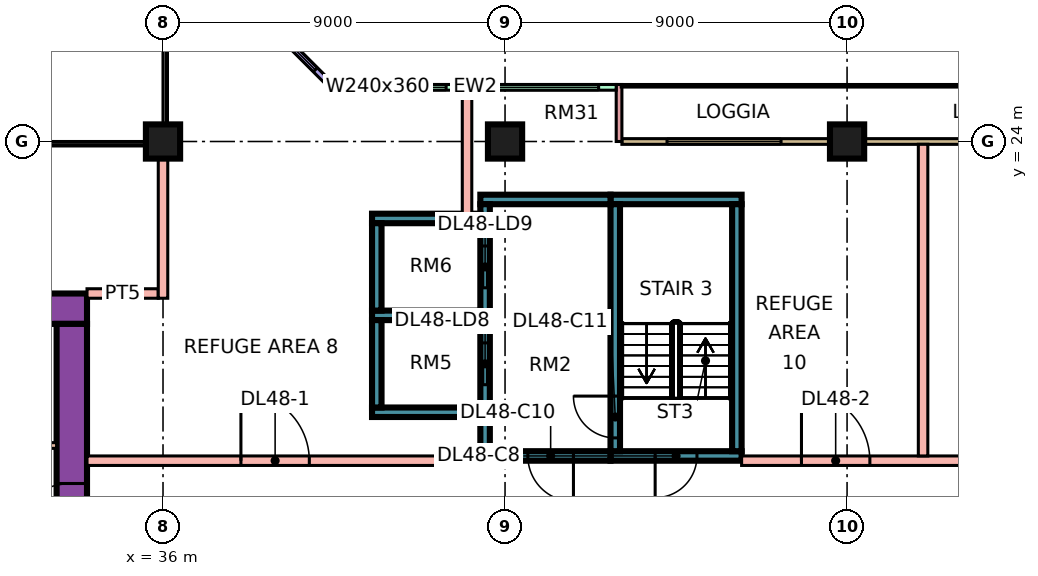
"""IFC4 building model, lengths in metres.
Left out: names, types, materials, properties, quantities, classifications, styles, units other than length and angle.
Written with IfcOpenShell. Run it as: python <this file> out.ifc"""

import sys

from ifc_helpers import new_model, si_unit, direction, frame, frame_2d, origin, origin_2d, place, context, subcontext, project, spatial, rectangle, extrude, element, fill, save


model = new_model("IFC4")
c1 = context("Model", 3, precision=1e-05, world=origin(), true_north=direction((0.0, 1.0)))
c2 = subcontext(c1, "Body", "Model", "MODEL_VIEW")
j1 = project(units=[si_unit("LENGTHUNIT", "METRE"), si_unit("PLANEANGLEUNIT", "RADIAN")], contexts=[c1])
p1 = place(None, origin())
s1 = spatial("IfcSite", under=j1, at=p1, CompositionType="ELEMENT")
p2 = place(p1, origin())
s2 = spatial("IfcBuilding", under=s1, at=p2, CompositionType="ELEMENT")
p3 = place(p2, frame((0.0, 0.0, 206.15)))
s3 = spatial("IfcBuildingStorey", under=s2, at=p3, CompositionType="ELEMENT", Elevation=206.15)
for number, where, z_axis, x_axis in (
    (1, (36.0, 24.0, 0.0), (0.0, 0.0, 1.0), (1.0, 0.0, 0.0)),
    (2, (45.0, 24.0, 0.0), (0.0, 0.0, 1.0), (1.0, 0.0, 0.0)),
    (3, (54.0, 24.0, 0.0), (0.0, 0.0, 1.0), (1.0, 0.0, 0.0)),
):
    element("IfcColumn", number, at=place(p3, frame(where, z_axis=z_axis, x_axis=x_axis)), inside=s3, PredefinedType="COLUMN", context=c2, shape_type="SweptSolid", body=[
        extrude(rectangle(XDim=0.9, YDim=0.9, at=origin_2d()), origin(), (0.0, 0.0, 1.0), 5.5),
    ])
p4 = place(p3, frame((9.0, 19.6, 0.0), z_axis=(0.0, 0.0, 1.0), x_axis=(1.0, 0.0, 0.0)))
e4 = element("IfcWall", 4, at=p4, inside=s3, PredefinedType="SHEAR", context=c2, shape_type="SweptSolid", body=[
    extrude(rectangle(XDim=25.0, YDim=0.8, at=frame_2d((12.5, 0.0))), origin(), (0.0, 0.0, 1.0), 5.5),
])
p5 = place(p4, frame((19.1, 0.0, 0.0)))
e5 = element("IfcOpeningElement", 5, at=p5, cuts=e4, PredefinedType="OPENING", context=c2, shape_type="SweptSolid", body=[
    extrude(rectangle(XDim=1.8, YDim=2.4, at=frame_2d((0.9, 1.2))), frame((0.0, 0.41, 0.0), z_axis=(0.0, -1.0, 0.0), x_axis=(1.0, 0.0, 0.0)), (0.0, 0.0, 1.0), 0.82),
])
p6 = place(p3, frame((33.6, 7.8, 0.0), z_axis=(0.0, 0.0, 1.0), x_axis=(0.0, 1.0, 0.0)))
e6 = element("IfcWall", 6, at=p6, inside=s3, PredefinedType="SHEAR", context=c2, shape_type="SweptSolid", body=[
    extrude(rectangle(XDim=11.4, YDim=0.8, at=frame_2d((5.7, 0.0))), origin(), (0.0, 0.0, 1.0), 5.5),
])
p7 = place(p6, frame((5.4, 0.0, 0.0)))
e7 = element("IfcOpeningElement", 7, at=p7, cuts=e6, PredefinedType="OPENING", context=c2, shape_type="SweptSolid", body=[
    extrude(rectangle(XDim=1.8, YDim=2.4, at=frame_2d((0.9, 1.2))), frame((0.0, 0.41, 0.0), z_axis=(0.0, -1.0, 0.0), x_axis=(1.0, 0.0, 0.0)), (0.0, 0.0, 1.0), 0.82),
])
p8 = place(p3, frame((47.775, 15.725, 0.0), z_axis=(0.0, 0.0, 1.0), x_axis=(1.0, 0.0, 0.0)))
e8 = element("IfcWall", 8, at=p8, inside=s3, PredefinedType="SHEAR", context=c2, shape_type="SweptSolid", body=[
    extrude(rectangle(XDim=3.45, YDim=0.25, at=frame_2d((1.725, 0.0))), origin(), (0.0, 0.0, 1.0), 5.5),
])
p9 = place(p8, frame((1.175, 0.0, 0.0)))
e9 = element("IfcOpeningElement", 9, at=p9, cuts=e8, PredefinedType="OPENING", context=c2, shape_type="SweptSolid", body=[
    extrude(rectangle(XDim=1.1, YDim=2.2, at=frame_2d((0.55, 1.1))), frame((0.0, 0.135, 0.0), z_axis=(0.0, -1.0, 0.0), x_axis=(1.0, 0.0, 0.0)), (0.0, 0.0, 1.0), 0.27),
])
p10 = place(p3, frame((47.775, 22.475, 0.0), z_axis=(0.0, 0.0, 1.0), x_axis=(1.0, 0.0, 0.0)))
e10 = element("IfcWall", 10, at=p10, inside=s3, PredefinedType="SHEAR", context=c2, shape_type="SweptSolid", body=[
    extrude(rectangle(XDim=3.45, YDim=0.25, at=frame_2d((1.725, 0.0))), origin(), (0.0, 0.0, 1.0), 5.5),
])
p11 = place(p3, frame((47.9, 15.85, 0.0), z_axis=(0.0, 0.0, 1.0), x_axis=(0.0, 1.0, 0.0)))
e11 = element("IfcWall", 11, at=p11, inside=s3, PredefinedType="SHEAR", context=c2, shape_type="SweptSolid", body=[
    extrude(rectangle(XDim=6.5, YDim=0.25, at=frame_2d((3.25, 0.0))), origin(), (0.0, 0.0, 1.0), 5.5),
])
p12 = place(p11, frame((0.35, 0.0, 0.0)))
e12 = element("IfcOpeningElement", 12, at=p12, cuts=e11, PredefinedType="OPENING", context=c2, shape_type="SweptSolid", body=[
    extrude(rectangle(XDim=1.1, YDim=2.2, at=frame_2d((0.55, 1.1))), frame((0.0, 0.135, 0.0), z_axis=(0.0, -1.0, 0.0), x_axis=(1.0, 0.0, 0.0)), (0.0, 0.0, 1.0), 0.27),
])
p13 = place(p3, frame((51.1, 15.85, 0.0), z_axis=(0.0, 0.0, 1.0), x_axis=(0.0, 1.0, 0.0)))
e13 = element("IfcWall", 13, at=p13, inside=s3, PredefinedType="SHEAR", context=c2, shape_type="SweptSolid", body=[
    extrude(rectangle(XDim=6.5, YDim=0.25, at=frame_2d((3.25, 0.0))), origin(), (0.0, 0.0, 1.0), 5.5),
])
p14 = place(p3, frame((44.35, 15.725, 0.0), z_axis=(0.0, 0.0, 1.0), x_axis=(1.0, 0.0, 0.0)))
e14 = element("IfcWall", 14, at=p14, inside=s3, PredefinedType="SHEAR", context=c2, shape_type="SweptSolid", body=[
    extrude(rectangle(XDim=3.425, YDim=0.25, at=frame_2d((1.712, 0.0))), origin(), (0.0, 0.0, 1.0), 5.5),
])
p15 = place(p14, frame((1.25, 0.0, 0.0)))
e15 = element("IfcOpeningElement", 15, at=p15, cuts=e14, PredefinedType="OPENING", context=c2, shape_type="SweptSolid", body=[
    extrude(rectangle(XDim=1.2, YDim=2.2, at=frame_2d((0.6, 1.1))), frame((0.0, 0.135, 0.0), z_axis=(0.0, -1.0, 0.0), x_axis=(1.0, 0.0, 0.0)), (0.0, 0.0, 1.0), 0.27),
])
p16 = place(p3, frame((44.35, 22.475, 0.0), z_axis=(0.0, 0.0, 1.0), x_axis=(1.0, 0.0, 0.0)))
e16 = element("IfcWall", 16, at=p16, inside=s3, PredefinedType="SHEAR", context=c2, shape_type="SweptSolid", body=[
    extrude(rectangle(XDim=3.425, YDim=0.25, at=frame_2d((1.712, 0.0))), origin(), (0.0, 0.0, 1.0), 5.5),
])
p17 = place(p3, frame((44.475, 15.85, 0.0), z_axis=(0.0, 0.0, 1.0), x_axis=(0.0, 1.0, 0.0)))
e17 = element("IfcWall", 17, at=p17, inside=s3, PredefinedType="SHEAR", context=c2, shape_type="SweptSolid", body=[
    extrude(rectangle(XDim=6.5, YDim=0.25, at=frame_2d((3.25, 0.0))), origin(), (0.0, 0.0, 1.0), 5.5),
])
p18 = place(p17, frame((1.75, 0.0, 0.0)))
e18 = element("IfcOpeningElement", 18, at=p18, cuts=e17, PredefinedType="OPENING", context=c2, shape_type="SweptSolid", body=[
    extrude(rectangle(XDim=1.1, YDim=2.2, at=frame_2d((0.55, 1.1))), frame((0.0, 0.135, 0.0), z_axis=(0.0, -1.0, 0.0), x_axis=(1.0, 0.0, 0.0)), (0.0, 0.0, 1.0), 0.27),
])
p19 = place(p17, frame((4.3, 0.0, 0.0)))
e19 = element("IfcOpeningElement", 19, at=p19, cuts=e17, PredefinedType="OPENING", context=c2, shape_type="SweptSolid", body=[
    extrude(rectangle(XDim=1.1, YDim=2.2, at=frame_2d((0.55, 1.1))), frame((0.0, 0.135, 0.0), z_axis=(0.0, -1.0, 0.0), x_axis=(1.0, 0.0, 0.0)), (0.0, 0.0, 1.0), 0.27),
])
for number, where, z_axis, x_axis in (
    (20, (41.5, 16.875, 0.0), (0.0, 0.0, 1.0), (1.0, 0.0, 0.0)),
    (21, (41.5, 19.425, 0.0), (0.0, 0.0, 1.0), (1.0, 0.0, 0.0)),
    (22, (41.5, 21.975, 0.0), (0.0, 0.0, 1.0), (1.0, 0.0, 0.0)),
):
    element("IfcWall", number, at=place(p3, frame(where, z_axis=z_axis, x_axis=x_axis)), inside=s3, PredefinedType="SHEAR", context=c2, shape_type="SweptSolid", body=[
        extrude(rectangle(XDim=2.85, YDim=0.25, at=frame_2d((1.425, 0.0))), origin(), (0.0, 0.0, 1.0), 5.5),
    ])
for number, where, z_axis, x_axis in (
    (23, (41.625, 17.0, 0.0), (0.0, 0.0, 1.0), (0.0, 1.0, 0.0)),
    (24, (41.625, 19.55, 0.0), (0.0, 0.0, 1.0), (0.0, 1.0, 0.0)),
):
    element("IfcWall", number, at=place(p3, frame(where, z_axis=z_axis, x_axis=x_axis)), inside=s3, PredefinedType="SHEAR", context=c2, shape_type="SweptSolid", body=[
        extrude(rectangle(XDim=2.3, YDim=0.25, at=frame_2d((1.15, 0.0))), origin(), (0.0, 0.0, 1.0), 5.5),
    ])
p20 = place(p3, frame((61.425, 24.0, 0.0), z_axis=(0.0, 0.0, 1.0), x_axis=(-1.0, 0.0, 0.0)))
e25 = element("IfcWall", 25, at=p20, inside=s3, PredefinedType="SOLIDWALL", context=c2, shape_type="SweptSolid", body=[
    extrude(rectangle(XDim=13.35, YDim=0.15, at=frame_2d((6.675, 0.0))), origin(), (0.0, 0.0, 1.0), 5.1),
])
p21 = place(p20, frame((1.212, 0.0, 0.45)))
e26 = element("IfcOpeningElement", 26, at=p21, cuts=e25, PredefinedType="OPENING", context=c2, shape_type="SweptSolid", body=[
    extrude(rectangle(XDim=3.0, YDim=3.6, at=frame_2d((1.5, 1.8))), frame((0.0, 0.085, 0.0), z_axis=(0.0, -1.0, 0.0), x_axis=(1.0, 0.0, 0.0)), (0.0, 0.0, 1.0), 0.17),
])
p22 = place(p20, frame((9.163, 0.0, 0.45)))
e27 = element("IfcOpeningElement", 27, at=p22, cuts=e25, PredefinedType="OPENING", context=c2, shape_type="SweptSolid", body=[
    extrude(rectangle(XDim=3.0, YDim=3.6, at=frame_2d((1.5, 1.8))), frame((0.0, 0.085, 0.0), z_axis=(0.0, -1.0, 0.0), x_axis=(1.0, 0.0, 0.0)), (0.0, 0.0, 1.0), 0.17),
])
p23 = place(p3, frame((48.0, 25.5, 0.0), z_axis=(0.0, 0.0, 1.0), x_axis=(0.0, -1.0, 0.0)))
e28 = element("IfcWall", 28, at=p23, inside=s3, PredefinedType="SOLIDWALL", context=c2, shape_type="SweptSolid", body=[
    extrude(rectangle(XDim=1.5, YDim=0.15, at=frame_2d((0.75, 0.0))), origin(), (0.0, 0.0, 1.0), 5.1),
])
p24 = place(p3, frame((47.925, 25.425, 0.0), z_axis=(0.0, 0.0, 1.0), x_axis=(-1.0, 0.0, 0.0)))
e29 = element("IfcWall", 29, at=p24, inside=s3, PredefinedType="SOLIDWALL", context=c2, shape_type="SweptSolid", body=[
    extrude(rectangle(XDim=7.425, YDim=0.15, at=frame_2d((3.712, 0.0))), origin(), (0.0, 0.0, 1.0), 5.1),
])
p25 = place(p24, frame((0.462, 0.0, 0.45)))
e30 = element("IfcOpeningElement", 30, at=p25, cuts=e29, PredefinedType="OPENING", context=c2, shape_type="SweptSolid", body=[
    extrude(rectangle(XDim=3.0, YDim=3.6, at=frame_2d((1.5, 1.8))), frame((0.0, 0.085, 0.0), z_axis=(0.0, -1.0, 0.0), x_axis=(1.0, 0.0, 0.0)), (0.0, 0.0, 1.0), 0.17),
])
p26 = place(p24, frame((4.475, 0.0, 0.45)))
e31 = element("IfcOpeningElement", 31, at=p26, cuts=e29, PredefinedType="OPENING", context=c2, shape_type="SweptSolid", body=[
    extrude(rectangle(XDim=2.4, YDim=3.6, at=frame_2d((1.2, 1.8))), frame((0.0, 0.085, 0.0), z_axis=(0.0, -1.0, 0.0), x_axis=(1.0, 0.0, 0.0)), (0.0, 0.0, 1.0), 0.17),
])
p27 = place(p3, frame((40.447, 25.447, 0.0), z_axis=(0.0, 0.0, 1.0), x_axis=(-0.707106781187, 0.707106781187, 0.0)))
e32 = element("IfcWall", 32, at=p27, inside=s3, PredefinedType="SOLIDWALL", context=c2, shape_type="SweptSolid", body=[
    extrude(rectangle(XDim=4.243, YDim=0.15, at=frame_2d((2.121, 0.0))), origin(), (0.0, 0.0, 1.0), 5.1),
])
p28 = place(p27, frame((0.621, 0.0, 0.45)))
e33 = element("IfcOpeningElement", 33, at=p28, cuts=e32, PredefinedType="OPENING", context=c2, shape_type="SweptSolid", body=[
    extrude(rectangle(XDim=3.0, YDim=3.6, at=frame_2d((1.5, 1.8))), frame((0.0, 0.085, 0.0), z_axis=(0.0, -1.0, 0.0), x_axis=(1.0, 0.0, 0.0)), (0.0, 0.0, 1.0), 0.17),
])
p29 = place(p3, frame((31.2, 16.0, 0.0), z_axis=(0.0, 0.0, 1.0), x_axis=(1.0, 0.0, 0.0)))
e34 = element("IfcWall", 34, at=p29, inside=s3, PredefinedType="PARTITIONING", context=c2, shape_type="SweptSolid", body=[
    extrude(rectangle(XDim=2.0, YDim=0.15, at=frame_2d((1.0, 0.0))), origin(), (0.0, 0.0, 1.0), 5.1),
])
p30 = place(p3, frame((34.0, 15.6, 0.0), z_axis=(0.0, 0.0, 1.0), x_axis=(1.0, 0.0, 0.0)))
e35 = element("IfcWall", 35, at=p30, inside=s3, PredefinedType="PARTITIONING", context=c2, shape_type="SweptSolid", body=[
    extrude(rectangle(XDim=10.35, YDim=0.25, at=frame_2d((5.175, 0.0))), origin(), (0.0, 0.0, 1.0), 5.1),
])
p31 = place(p30, frame((4.05, 0.0, 0.0)))
e36 = element("IfcOpeningElement", 36, at=p31, cuts=e35, PredefinedType="OPENING", context=c2, shape_type="SweptSolid", body=[
    extrude(rectangle(XDim=1.8, YDim=2.1, at=frame_2d((0.9, 1.05))), frame((0.0, 0.135, 0.0), z_axis=(0.0, -1.0, 0.0), x_axis=(1.0, 0.0, 0.0)), (0.0, 0.0, 1.0), 0.27),
])
p32 = place(p3, frame((34.0, 20.0, 0.0), z_axis=(0.0, 0.0, 1.0), x_axis=(1.0, 0.0, 0.0)))
e37 = element("IfcWall", 37, at=p32, inside=s3, PredefinedType="PARTITIONING", context=c2, shape_type="SweptSolid", body=[
    extrude(rectangle(XDim=1.875, YDim=0.25, at=frame_2d((0.938, 0.0))), origin(), (0.0, 0.0, 1.0), 5.1),
])
p33 = place(p3, frame((36.0, 19.875, 0.0), z_axis=(0.0, 0.0, 1.0), x_axis=(0.0, 1.0, 0.0)))
e38 = element("IfcWall", 38, at=p33, inside=s3, PredefinedType="PARTITIONING", context=c2, shape_type="SweptSolid", body=[
    extrude(rectangle(XDim=4.125, YDim=0.25, at=frame_2d((2.062, 0.0))), origin(), (0.0, 0.0, 1.0), 5.1),
])
p34 = place(p3, frame((44.0, 22.1, 0.0), z_axis=(0.0, 0.0, 1.0), x_axis=(0.0, 1.0, 0.0)))
e39 = element("IfcWall", 39, at=p34, inside=s3, PredefinedType="PARTITIONING", context=c2, shape_type="SweptSolid", body=[
    extrude(rectangle(XDim=3.25, YDim=0.25, at=frame_2d((1.625, 0.0))), origin(), (0.0, 0.0, 1.0), 5.1),
])
p35 = place(p3, frame((51.225, 15.6, 0.0), z_axis=(0.0, 0.0, 1.0), x_axis=(1.0, 0.0, 0.0)))
e40 = element("IfcWall", 40, at=p35, inside=s3, PredefinedType="PARTITIONING", context=c2, shape_type="SweptSolid", body=[
    extrude(rectangle(XDim=13.125, YDim=0.25, at=frame_2d((6.562, 0.0))), origin(), (0.0, 0.0, 1.0), 5.1),
])
p36 = place(p35, frame((1.575, 0.0, 0.0)))
e41 = element("IfcOpeningElement", 41, at=p36, cuts=e40, PredefinedType="OPENING", context=c2, shape_type="SweptSolid", body=[
    extrude(rectangle(XDim=1.8, YDim=2.1, at=frame_2d((0.9, 1.05))), frame((0.0, 0.135, 0.0), z_axis=(0.0, -1.0, 0.0), x_axis=(1.0, 0.0, 0.0)), (0.0, 0.0, 1.0), 0.27),
])
p37 = place(p35, frame((6.825, 0.0, 0.0)))
e42 = element("IfcOpeningElement", 42, at=p37, cuts=e40, PredefinedType="OPENING", context=c2, shape_type="SweptSolid", body=[
    extrude(rectangle(XDim=1.8, YDim=2.1, at=frame_2d((0.9, 1.05))), frame((0.0, 0.135, 0.0), z_axis=(0.0, -1.0, 0.0), x_axis=(1.0, 0.0, 0.0)), (0.0, 0.0, 1.0), 0.27),
])
p38 = place(p3, frame((56.0, 15.725, 0.0), z_axis=(0.0, 0.0, 1.0), x_axis=(0.0, 1.0, 0.0)))
e43 = element("IfcWall", 43, at=p38, inside=s3, PredefinedType="PARTITIONING", context=c2, shape_type="SweptSolid", body=[
    extrude(rectangle(XDim=8.201, YDim=0.25, at=frame_2d((4.101, 0.0))), origin(), (0.0, 0.0, 1.0), 5.1),
])
p39 = place(p22, origin())
e44 = element("IfcWindow", 44, at=p39, inside=s3, PartitioningType="SINGLE_PANEL", PredefinedType="WINDOW", context=c2, shape_type="SweptSolid", body=[
    extrude(rectangle(XDim=3.0, YDim=3.6, at=frame_2d((1.5, 1.8))), frame((0.0, 0.03, 0.0), z_axis=(0.0, -1.0, 0.0), x_axis=(1.0, 0.0, 0.0)), (0.0, 0.0, 1.0), 0.06),
])
fill(e27, e44)
p40 = place(p25, origin())
e45 = element("IfcWindow", 45, at=p40, inside=s3, PartitioningType="SINGLE_PANEL", PredefinedType="WINDOW", context=c2, shape_type="SweptSolid", body=[
    extrude(rectangle(XDim=3.0, YDim=3.6, at=frame_2d((1.5, 1.8))), frame((0.0, 0.03, 0.0), z_axis=(0.0, -1.0, 0.0), x_axis=(1.0, 0.0, 0.0)), (0.0, 0.0, 1.0), 0.06),
])
fill(e30, e45)
p41 = place(p26, origin())
e46 = element("IfcWindow", 46, at=p41, inside=s3, PartitioningType="SINGLE_PANEL", PredefinedType="WINDOW", context=c2, shape_type="SweptSolid", body=[
    extrude(rectangle(XDim=2.4, YDim=3.6, at=frame_2d((1.2, 1.8))), frame((0.0, 0.03, 0.0), z_axis=(0.0, -1.0, 0.0), x_axis=(1.0, 0.0, 0.0)), (0.0, 0.0, 1.0), 0.06),
])
fill(e31, e46)
p42 = place(p28, origin())
e47 = element("IfcWindow", 47, at=p42, inside=s3, PartitioningType="SINGLE_PANEL", PredefinedType="WINDOW", context=c2, shape_type="SweptSolid", body=[
    extrude(rectangle(XDim=3.0, YDim=3.6, at=frame_2d((1.5, 1.8))), frame((0.0, 0.03, 0.0), z_axis=(0.0, -1.0, 0.0), x_axis=(1.0, 0.0, 0.0)), (0.0, 0.0, 1.0), 0.06),
])
fill(e33, e47)
p43 = place(p7, origin())
e48 = element("IfcDoor", 48, at=p43, inside=s3, OperationType="DOUBLE_DOOR_SINGLE_SWING", PredefinedType="DOOR", context=c2, shape_type="SweptSolid", body=[
    extrude(rectangle(XDim=1.8, YDim=2.4, at=frame_2d((0.9, 1.2))), frame((0.0, 0.025, 0.0), z_axis=(0.0, -1.0, 0.0), x_axis=(1.0, 0.0, 0.0)), (0.0, 0.0, 1.0), 0.05),
])
fill(e7, e48)
p44 = place(p9, frame((1.1, 0.0, 0.0), z_axis=(0.0, 0.0, 1.0), x_axis=(-1.0, 0.0, 0.0)))
e49 = element("IfcDoor", 49, at=p44, inside=s3, OperationType="SINGLE_SWING_LEFT", PredefinedType="DOOR", context=c2, shape_type="SweptSolid", body=[
    extrude(rectangle(XDim=1.1, YDim=2.2, at=frame_2d((0.55, 1.1))), frame((0.0, 0.025, 0.0), z_axis=(0.0, -1.0, 0.0), x_axis=(1.0, 0.0, 0.0)), (0.0, 0.0, 1.0), 0.05),
])
fill(e9, e49)
p45 = place(p15, origin())
e50 = element("IfcDoor", 50, at=p45, inside=s3, OperationType="SINGLE_SWING_RIGHT", PredefinedType="DOOR", context=c2, shape_type="SweptSolid", body=[
    extrude(rectangle(XDim=1.2, YDim=2.2, at=frame_2d((0.6, 1.1))), frame((0.0, 0.025, 0.0), z_axis=(0.0, -1.0, 0.0), x_axis=(1.0, 0.0, 0.0)), (0.0, 0.0, 1.0), 0.05),
])
fill(e15, e50)
p46 = place(p12, frame((1.1, 0.0, 0.0), z_axis=(0.0, 0.0, 1.0), x_axis=(-1.0, 0.0, 0.0)))
e51 = element("IfcDoor", 51, at=p46, inside=s3, OperationType="SINGLE_SWING_RIGHT", PredefinedType="DOOR", context=c2, shape_type="SweptSolid", body=[
    extrude(rectangle(XDim=1.1, YDim=2.2, at=frame_2d((0.55, 1.1))), frame((0.0, 0.025, 0.0), z_axis=(0.0, -1.0, 0.0), x_axis=(1.0, 0.0, 0.0)), (0.0, 0.0, 1.0), 0.05),
])
fill(e12, e51)
p47 = place(p18, origin())
e52 = element("IfcDoor", 52, at=p47, inside=s3, OperationType="DOUBLE_DOOR_SLIDING", PredefinedType="DOOR", context=c2, shape_type="SweptSolid", body=[
    extrude(rectangle(XDim=1.1, YDim=2.2, at=frame_2d((0.55, 1.1))), frame((0.0, 0.025, 0.0), z_axis=(0.0, -1.0, 0.0), x_axis=(1.0, 0.0, 0.0)), (0.0, 0.0, 1.0), 0.05),
])
fill(e18, e52)
p48 = place(p19, origin())
e53 = element("IfcDoor", 53, at=p48, inside=s3, OperationType="DOUBLE_DOOR_SLIDING", PredefinedType="DOOR", context=c2, shape_type="SweptSolid", body=[
    extrude(rectangle(XDim=1.1, YDim=2.2, at=frame_2d((0.55, 1.1))), frame((0.0, 0.025, 0.0), z_axis=(0.0, -1.0, 0.0), x_axis=(1.0, 0.0, 0.0)), (0.0, 0.0, 1.0), 0.05),
])
fill(e19, e53)
p49 = place(p31, origin())
e54 = element("IfcDoor", 54, at=p49, inside=s3, OperationType="DOUBLE_DOOR_SINGLE_SWING", PredefinedType="DOOR", context=c2, shape_type="SweptSolid", body=[
    extrude(rectangle(XDim=1.8, YDim=2.1, at=frame_2d((0.9, 1.05))), frame((0.0, 0.025, 0.0), z_axis=(0.0, -1.0, 0.0), x_axis=(1.0, 0.0, 0.0)), (0.0, 0.0, 1.0), 0.05),
])
fill(e36, e54)
p50 = place(p36, origin())
e55 = element("IfcDoor", 55, at=p50, inside=s3, OperationType="DOUBLE_DOOR_SINGLE_SWING", PredefinedType="DOOR", context=c2, shape_type="SweptSolid", body=[
    extrude(rectangle(XDim=1.8, YDim=2.1, at=frame_2d((0.9, 1.05))), frame((0.0, 0.025, 0.0), z_axis=(0.0, -1.0, 0.0), x_axis=(1.0, 0.0, 0.0)), (0.0, 0.0, 1.0), 0.05),
])
fill(e41, e55)
save(model, sys.argv[1])
